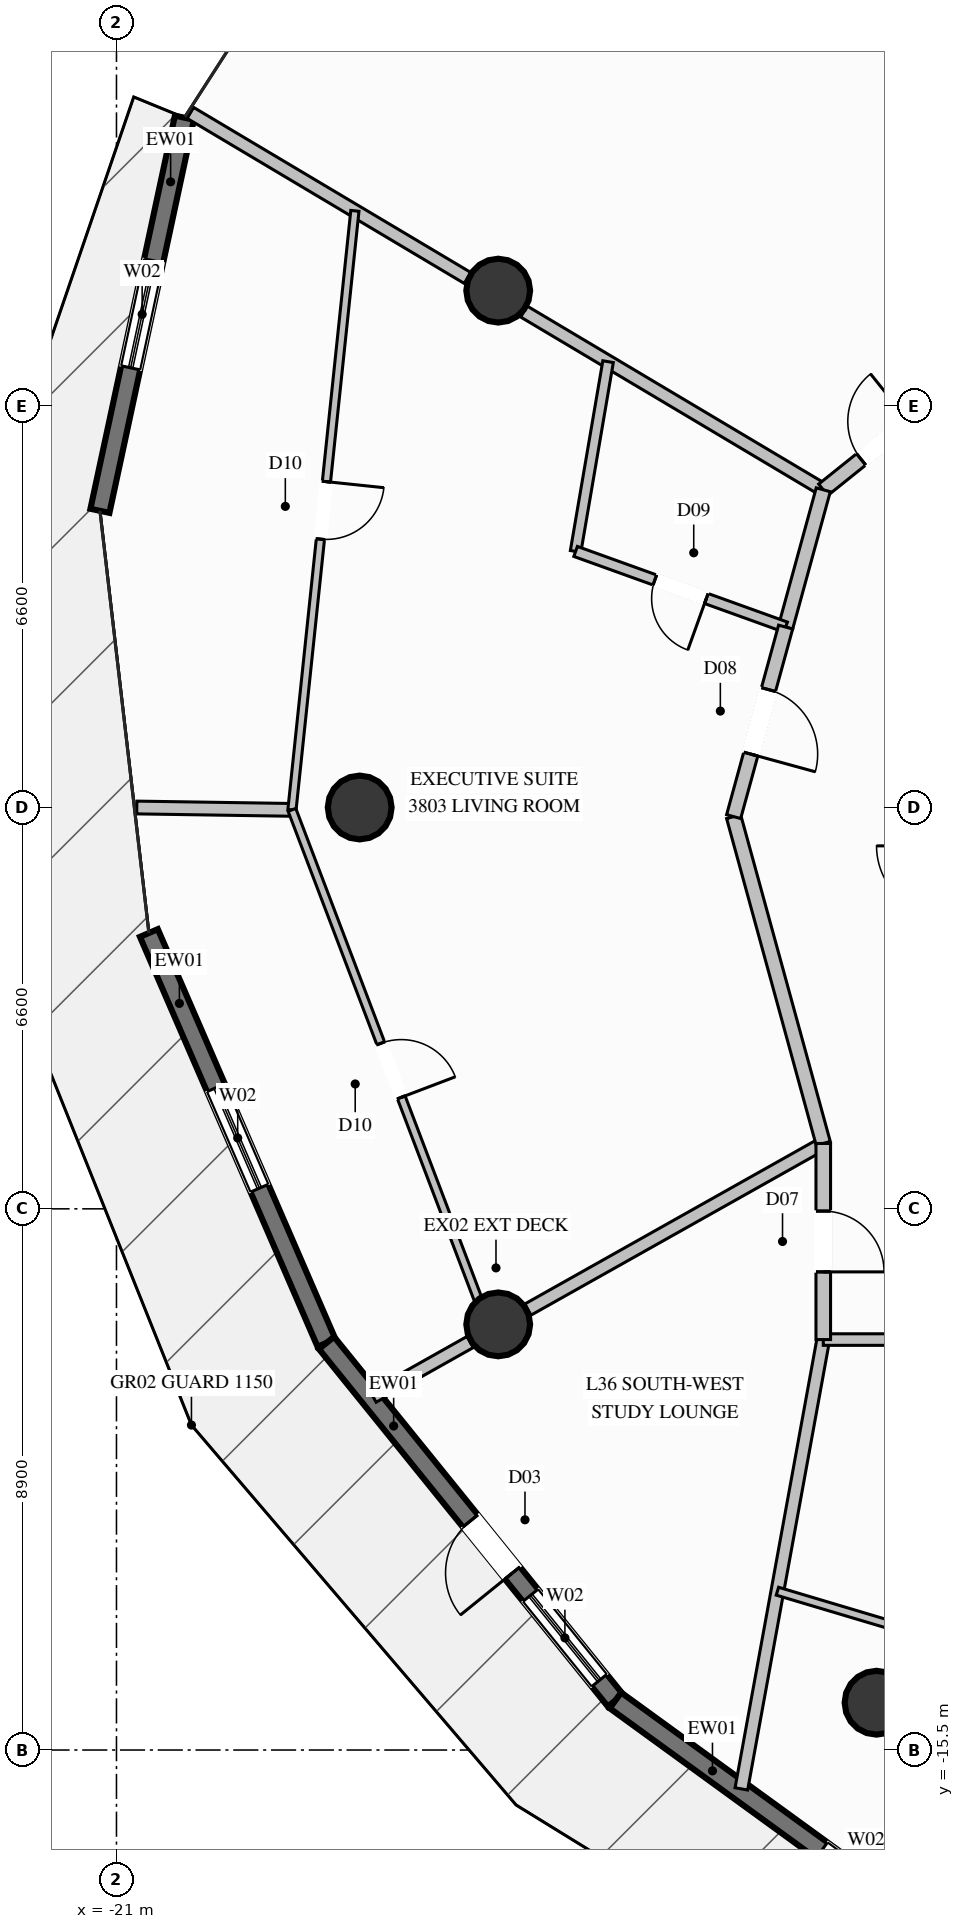
"""IFC4 building model, lengths in metres.
Left out: names, types, materials, properties, quantities, classifications, styles, units other than length and angle.
Written with IfcOpenShell. Run it as: python <this file> out.ifc"""

import sys

from ifc_helpers import new_model, si_unit, direction, frame, frame_2d, origin, origin_2d, place, context, subcontext, project, spatial, rectangle, circle, extrude, element, fill, save


model = new_model("IFC4")
c1 = context("Model", 3, precision=1e-05, world=origin(), true_north=direction((0.0, 1.0)))
c2 = subcontext(c1, "Body", "Model", "MODEL_VIEW")
j1 = project(units=[si_unit("LENGTHUNIT", "METRE"), si_unit("PLANEANGLEUNIT", "RADIAN")], contexts=[c1])
p1 = place(None, origin())
s1 = spatial("IfcSite", under=j1, at=p1, CompositionType="ELEMENT")
p2 = place(p1, origin())
s2 = spatial("IfcBuilding", under=s1, at=p2, CompositionType="ELEMENT")
p3 = place(p2, frame((0.0, 0.0, 142.2)))
s3 = spatial("IfcBuildingStorey", under=s2, at=p3, CompositionType="ELEMENT", Elevation=142.2)
for number, where, z_axis, x_axis in (
    (1, (-14.722, 8.5, 0.0), (0.0, 0.0, 1.0), (1.0, 0.0, 0.0)),
    (2, (-17.0, 0.0, 0.0), (0.0, 0.0, 1.0), (1.0, 0.0, 0.0)),
    (3, (-14.722, -8.5, 0.0), (0.0, 0.0, 1.0), (1.0, 0.0, 0.0)),
    (4, (-8.5, -14.722, 0.0), (0.0, 0.0, 1.0), (1.0, 0.0, 0.0)),
):
    element("IfcColumn", number, at=place(p3, frame(where, z_axis=z_axis, x_axis=x_axis)), inside=s3, PredefinedType="COLUMN", context=c2, shape_type="SweptSolid", body=[
        extrude(circle(Radius=0.525, at=origin_2d()), origin(), (0.0, 0.0, 1.0), 3.6),
    ])
p4 = place(p3, frame((-21.272, 4.879, 0.0), z_axis=(0.0, 0.0, 1.0), x_axis=(0.210040904663, 0.977692599117, 0.0)))
e5 = element("IfcWall", 5, at=p4, inside=s3, PredefinedType="SOLIDWALL", context=c2, shape_type="SweptSolid", body=[
    extrude(rectangle(XDim=6.613, YDim=0.32, at=frame_2d((3.306, 0.0))), origin(), (0.0, 0.0, 1.0), 3.35),
])
p5 = place(p4, frame((2.405, 0.0, 0.35)))
e6 = element("IfcOpeningElement", 6, at=p5, cuts=e5, PredefinedType="OPENING", context=c2, shape_type="SweptSolid", body=[
    extrude(rectangle(XDim=1.8, YDim=2.6, at=frame_2d((0.9, 1.3))), frame((0.0, 0.17, 0.0), z_axis=(0.0, -1.0, 0.0), x_axis=(1.0, 0.0, 0.0)), (0.0, 0.0, 1.0), 0.34),
])
p6 = place(p3, frame((-17.546, -8.805, 0.0), z_axis=(0.0, 0.0, 1.0), x_axis=(-0.39761396578, 0.917552796419, 0.0)))
e7 = element("IfcWall", 7, at=p6, inside=s3, PredefinedType="SOLIDWALL", context=c2, shape_type="SweptSolid", body=[
    extrude(rectangle(XDim=7.347, YDim=0.32, at=frame_2d((3.673, 0.0))), origin(), (0.0, 0.0, 1.0), 3.35),
])
p7 = place(p6, frame((2.773, 0.0, 0.35)))
e8 = element("IfcOpeningElement", 8, at=p7, cuts=e7, PredefinedType="OPENING", context=c2, shape_type="SweptSolid", body=[
    extrude(rectangle(XDim=1.8, YDim=2.6, at=frame_2d((0.9, 1.3))), frame((0.0, 0.17, 0.0), z_axis=(0.0, -1.0, 0.0), x_axis=(1.0, 0.0, 0.0)), (0.0, 0.0, 1.0), 0.34),
])
p8 = place(p3, frame((-12.794, -14.684, 0.0), z_axis=(0.0, 0.0, 1.0), x_axis=(-0.628609951101, 0.77772072711, 0.0)))
e9 = element("IfcWall", 9, at=p8, inside=s3, PredefinedType="SOLIDWALL", context=c2, shape_type="SweptSolid", body=[
    extrude(rectangle(XDim=7.56, YDim=0.32, at=frame_2d((3.78, 0.0))), origin(), (0.0, 0.0, 1.0), 3.35),
])
p9 = place(p8, frame((0.422, 0.0, 0.35)))
e10 = element("IfcOpeningElement", 10, at=p9, cuts=e9, PredefinedType="OPENING", context=c2, shape_type="SweptSolid", body=[
    extrude(rectangle(XDim=1.8, YDim=2.6, at=frame_2d((0.9, 1.3))), frame((0.0, 0.17, 0.0), z_axis=(0.0, -1.0, 0.0), x_axis=(1.0, 0.0, 0.0)), (0.0, 0.0, 1.0), 0.34),
])
p10 = place(p8, frame((2.695, 0.0, 0.0)))
e11 = element("IfcOpeningElement", 11, at=p10, cuts=e9, PredefinedType="OPENING", context=c2, shape_type="SweptSolid", body=[
    extrude(rectangle(XDim=1.1, YDim=2.2, at=frame_2d((0.55, 1.1))), frame((0.0, 0.17, 0.0), z_axis=(0.0, -1.0, 0.0), x_axis=(1.0, 0.0, 0.0)), (0.0, 0.0, 1.0), 0.34),
])
p11 = place(p3, frame((-6.678, -19.125, 0.0), z_axis=(0.0, 0.0, 1.0), x_axis=(-0.809180040303, 0.587560773347, 0.0)))
e12 = element("IfcWall", 12, at=p11, inside=s3, PredefinedType="SOLIDWALL", context=c2, shape_type="SweptSolid", body=[
    extrude(rectangle(XDim=7.558, YDim=0.32, at=frame_2d((3.779, 0.0))), origin(), (0.0, 0.0, 1.0), 3.35),
])
p12 = place(p11, frame((1.564, 0.0, 0.35)))
e13 = element("IfcOpeningElement", 13, at=p12, cuts=e12, PredefinedType="OPENING", context=c2, shape_type="SweptSolid", body=[
    extrude(rectangle(XDim=1.8, YDim=2.6, at=frame_2d((0.9, 1.3))), frame((0.0, 0.17, 0.0), z_axis=(0.0, -1.0, 0.0), x_axis=(1.0, 0.0, 0.0)), (0.0, 0.0, 1.0), 0.34),
])
p13 = place(p3, frame((-9.376, 5.225, 0.0), z_axis=(0.0, 0.0, 1.0), x_axis=(-0.859254979659, 0.511547534381, 0.0)))
e14 = element("IfcWall", 14, at=p13, inside=s3, PredefinedType="PARTITIONING", context=c2, shape_type="SweptSolid", body=[
    extrude(rectangle(XDim=5.729, YDim=0.21, at=frame_2d((2.865, 0.0))), origin(), (0.0, 0.0, 1.0), 2.718),
])
p14 = place(p3, frame((-15.226, 8.708, 0.0), z_axis=(0.0, 0.0, 1.0), x_axis=(-0.859169116006, 0.511691733471, 0.0)))
e15 = element("IfcWall", 15, at=p14, inside=s3, PredefinedType="PARTITIONING", context=c2, shape_type="SweptSolid", body=[
    extrude(rectangle(XDim=5.306, YDim=0.21, at=frame_2d((2.653, 0.0))), origin(), (0.0, 0.0, 1.0), 3.35),
])
p15 = place(p3, frame((-9.376, -5.525, 0.0), z_axis=(0.0, 0.0, 1.0), x_axis=(-0.87160595107, -0.49020716647, 0.0)))
e16 = element("IfcWall", 16, at=p15, inside=s3, PredefinedType="PARTITIONING", context=c2, shape_type="SweptSolid", body=[
    extrude(rectangle(XDim=5.573, YDim=0.21, at=frame_2d((2.787, 0.0))), origin(), (0.0, 0.0, 1.0), 2.718),
])
p16 = place(p3, frame((-15.183, -8.79, 0.0), z_axis=(0.0, 0.0, 1.0), x_axis=(-0.871550642062, -0.490305494892, 0.0)))
e17 = element("IfcWall", 17, at=p16, inside=s3, PredefinedType="PARTITIONING", context=c2, shape_type="SweptSolid", body=[
    extrude(rectangle(XDim=1.833, YDim=0.21, at=frame_2d((0.917, 0.0))), origin(), (0.0, 0.0, 1.0), 3.35),
])
p17 = place(p3, frame((-9.376, 5.225, 0.0), z_axis=(0.0, 0.0, 1.0), x_axis=(0.780061082582, 0.625703370169, 0.0)))
e18 = element("IfcWall", 18, at=p17, inside=s3, PredefinedType="PARTITIONING", context=c2, shape_type="SweptSolid", body=[
    extrude(rectangle(XDim=2.597, YDim=0.24, at=frame_2d((1.299, 0.0))), origin(), (0.0, 0.0, 1.0), 3.35),
])
p18 = place(p17, frame((0.799, 0.0, 0.0)))
e19 = element("IfcOpeningElement", 19, at=p18, cuts=e18, PredefinedType="OPENING", context=c2, shape_type="SweptSolid", body=[
    extrude(rectangle(XDim=1.0, YDim=2.2, at=frame_2d((0.5, 1.1))), frame((0.0, 0.13, 0.0), z_axis=(0.0, -1.0, 0.0), x_axis=(1.0, 0.0, 0.0)), (0.0, 0.0, 1.0), 0.26),
])
p19 = place(p3, frame((-9.376, 5.225, 0.0), z_axis=(0.0, 0.0, 1.0), x_axis=(-0.264431780812, -0.964404393031, 0.0)))
e20 = element("IfcWall", 20, at=p19, inside=s3, PredefinedType="PARTITIONING", context=c2, shape_type="SweptSolid", body=[
    extrude(rectangle(XDim=2.341, YDim=0.24, at=frame_2d((1.171, 0.0))), origin(), (0.0, 0.0, 1.0), 3.35),
])
p20 = place(p3, frame((-12.915, 7.332, 0.0), z_axis=(0.0, 0.0, 1.0), x_axis=(-0.168623538304, -0.985680527519, 0.0)))
e21 = element("IfcWall", 21, at=p20, inside=s3, PredefinedType="PLUMBINGWALL", context=c2, shape_type="SweptSolid", body=[
    extrude(rectangle(XDim=3.167, YDim=0.175, at=frame_2d((1.583, 0.0))), origin(), (0.0, 0.0, 1.0), 3.35),
])
p21 = place(p3, frame((-9.995, 2.967, 0.0), z_axis=(0.0, 0.0, 1.0), x_axis=(-0.940843318569, 0.338841924656, 0.0)))
e22 = element("IfcWall", 22, at=p21, inside=s3, PredefinedType="PLUMBINGWALL", context=c2, shape_type="SweptSolid", body=[
    extrude(rectangle(XDim=3.671, YDim=0.175, at=frame_2d((1.835, 0.0))), origin(), (0.0, 0.0, 1.0), 3.35),
])
p22 = place(p21, frame((1.386, 0.0, 0.0)))
e23 = element("IfcOpeningElement", 23, at=p22, cuts=e22, PredefinedType="OPENING", context=c2, shape_type="SweptSolid", body=[
    extrude(rectangle(XDim=0.9, YDim=2.1, at=frame_2d((0.45, 1.05))), frame((0.0, 0.098, 0.0), z_axis=(0.0, -1.0, 0.0), x_axis=(1.0, 0.0, 0.0)), (0.0, 0.0, 1.0), 0.195),
])
p23 = place(p3, frame((-18.114, -0.039, 0.0), z_axis=(0.0, 0.0, 1.0), x_axis=(-0.999882874418, 0.015304817747, 0.0)))
e24 = element("IfcWall", 24, at=p23, inside=s3, PredefinedType="PARTITIONING", context=c2, shape_type="SweptSolid", body=[
    extrude(rectangle(XDim=2.552, YDim=0.21, at=frame_2d((1.276, 0.0))), origin(), (0.0, 0.0, 1.0), 3.35),
])
p24 = place(p3, frame((-10.85, -0.15, 0.0), z_axis=(0.0, 0.0, 1.0), x_axis=(0.264488542062, -0.964388827765, 0.0)))
e25 = element("IfcWall", 25, at=p24, inside=s3, PredefinedType="PARTITIONING", context=c2, shape_type="SweptSolid", body=[
    extrude(rectangle(XDim=5.573, YDim=0.24, at=frame_2d((2.787, 0.0))), origin(), (0.0, 0.0, 1.0), 3.35),
])
p25 = place(p3, frame((-9.995, 2.967, 0.0), z_axis=(0.0, 0.0, 1.0), x_axis=(-0.264529660797, -0.9643775498, 0.0)))
e26 = element("IfcWall", 26, at=p25, inside=s3, PredefinedType="PARTITIONING", context=c2, shape_type="SweptSolid", body=[
    extrude(rectangle(XDim=3.232, YDim=0.24, at=frame_2d((1.616, 0.0))), origin(), (0.0, 0.0, 1.0), 3.35),
])
p26 = place(p25, frame((1.066, 0.0, 0.0)))
e27 = element("IfcOpeningElement", 27, at=p26, cuts=e26, PredefinedType="OPENING", context=c2, shape_type="SweptSolid", body=[
    extrude(rectangle(XDim=1.1, YDim=2.3, at=frame_2d((0.55, 1.15))), frame((0.0, 0.13, 0.0), z_axis=(0.0, -1.0, 0.0), x_axis=(1.0, 0.0, 0.0)), (0.0, 0.0, 1.0), 0.26),
])
p27 = place(p3, frame((-17.079, 9.812, 0.0), z_axis=(0.0, 0.0, 1.0), x_axis=(-0.104480781991, -0.994526905717, 0.0)))
e28 = element("IfcWall", 28, at=p27, inside=s3, PredefinedType="PARTITIONING", context=c2, shape_type="SweptSolid", body=[
    extrude(rectangle(XDim=9.905, YDim=0.135, at=frame_2d((4.953, 0.0))), origin(), (0.0, 0.0, 1.0), 3.35),
])
p28 = place(p27, frame((4.478, 0.0, 0.0)))
e29 = element("IfcOpeningElement", 29, at=p28, cuts=e28, PredefinedType="OPENING", context=c2, shape_type="SweptSolid", body=[
    extrude(rectangle(XDim=0.95, YDim=2.1, at=frame_2d((0.475, 1.05))), frame((0.0, 0.078, 0.0), z_axis=(0.0, -1.0, 0.0), x_axis=(1.0, 0.0, 0.0)), (0.0, 0.0, 1.0), 0.155),
])
p29 = place(p3, frame((-18.114, -0.039, 0.0), z_axis=(0.0, 0.0, 1.0), x_axis=(0.355469126908, -0.93468802272, 0.0)))
e30 = element("IfcWall", 30, at=p29, inside=s3, PredefinedType="PARTITIONING", context=c2, shape_type="SweptSolid", body=[
    extrude(rectangle(XDim=9.166, YDim=0.135, at=frame_2d((4.583, 0.0))), origin(), (0.0, 0.0, 1.0), 2.879),
])
p30 = place(p29, frame((4.108, 0.0, 0.0)))
e31 = element("IfcOpeningElement", 31, at=p30, cuts=e30, PredefinedType="OPENING", context=c2, shape_type="SweptSolid", body=[
    extrude(rectangle(XDim=0.95, YDim=2.1, at=frame_2d((0.475, 1.05))), frame((0.0, 0.078, 0.0), z_axis=(0.0, -1.0, 0.0), x_axis=(1.0, 0.0, 0.0)), (0.0, 0.0, 1.0), 0.155),
])
p31 = place(p3, frame((-9.376, -8.75, 0.0), z_axis=(0.0, 0.0, 1.0), x_axis=(-0.17933451975, -0.983788153022, 0.0)))
e32 = element("IfcWall", 32, at=p31, inside=s3, PredefinedType="PARTITIONING", context=c2, shape_type="SweptSolid", body=[
    extrude(rectangle(XDim=7.511, YDim=0.21, at=frame_2d((3.755, 0.0))), origin(), (0.0, 0.0, 1.0), 3.35),
])
p32 = place(p3, frame((-9.376, -8.75, 0.0), z_axis=(0.0, 0.0, 1.0), x_axis=(1.0, 0.0, 0.0)))
e33 = element("IfcWall", 33, at=p32, inside=s3, PredefinedType="PARTITIONING", context=c2, shape_type="SweptSolid", body=[
    extrude(rectangle(XDim=9.376, YDim=0.19, at=frame_2d((4.688, 0.0))), origin(), (0.0, 0.0, 1.0), 3.35),
])
p33 = place(p32, frame((4.213, 0.0, 0.0)))
e34 = element("IfcOpeningElement", 34, at=p33, cuts=e33, PredefinedType="OPENING", context=c2, shape_type="SweptSolid", body=[
    extrude(rectangle(XDim=0.95, YDim=2.1, at=frame_2d((0.475, 1.05))), frame((0.0, 0.105, 0.0), z_axis=(0.0, -1.0, 0.0), x_axis=(1.0, 0.0, 0.0)), (0.0, 0.0, 1.0), 0.21),
])
p34 = place(p3, frame((-9.376, -5.525, 0.0), z_axis=(0.0, 0.0, 1.0), x_axis=(0.0, -1.0, 0.0)))
e35 = element("IfcWall", 35, at=p34, inside=s3, PredefinedType="PARTITIONING", context=c2, shape_type="SweptSolid", body=[
    extrude(rectangle(XDim=3.225, YDim=0.24, at=frame_2d((1.613, 0.0))), origin(), (0.0, 0.0, 1.0), 3.35),
])
p35 = place(p34, frame((1.112, 0.0, 0.0)))
e36 = element("IfcOpeningElement", 36, at=p35, cuts=e35, PredefinedType="OPENING", context=c2, shape_type="SweptSolid", body=[
    extrude(rectangle(XDim=1.0, YDim=2.2, at=frame_2d((0.5, 1.1))), frame((0.0, 0.13, 0.0), z_axis=(0.0, -1.0, 0.0), x_axis=(1.0, 0.0, 0.0)), (0.0, 0.0, 1.0), 0.26),
])
p36 = place(p3, frame((-10.13, -12.888, 0.0), z_axis=(0.0, 0.0, 1.0), x_axis=(0.958256793562, -0.28590893234, 0.0)))
e37 = element("IfcWall", 37, at=p36, inside=s3, PredefinedType="PARTITIONING", context=c2, shape_type="SweptSolid", body=[
    extrude(rectangle(XDim=10.836, YDim=0.135, at=frame_2d((5.418, 0.0))), origin(), (0.0, 0.0, 1.0), 3.35),
])
p37 = place(p36, frame((4.943, 0.0, 0.0)))
e38 = element("IfcOpeningElement", 38, at=p37, cuts=e37, PredefinedType="OPENING", context=c2, shape_type="SweptSolid", body=[
    extrude(rectangle(XDim=0.95, YDim=2.1, at=frame_2d((0.475, 1.05))), frame((0.0, 0.078, 0.0), z_axis=(0.0, -1.0, 0.0), x_axis=(1.0, 0.0, 0.0)), (0.0, 0.0, 1.0), 0.155),
])
p38 = place(p5, origin())
e39 = element("IfcWindow", 39, at=p38, inside=s3, PartitioningType="SINGLE_PANEL", PredefinedType="WINDOW", context=c2, shape_type="SweptSolid", body=[
    extrude(rectangle(XDim=1.8, YDim=2.6, at=frame_2d((0.9, 1.3))), frame((0.0, 0.03, 0.0), z_axis=(0.0, -1.0, 0.0), x_axis=(1.0, 0.0, 0.0)), (0.0, 0.0, 1.0), 0.06),
])
fill(e6, e39)
p39 = place(p7, origin())
e40 = element("IfcWindow", 40, at=p39, inside=s3, PartitioningType="SINGLE_PANEL", PredefinedType="WINDOW", context=c2, shape_type="SweptSolid", body=[
    extrude(rectangle(XDim=1.8, YDim=2.6, at=frame_2d((0.9, 1.3))), frame((0.0, 0.03, 0.0), z_axis=(0.0, -1.0, 0.0), x_axis=(1.0, 0.0, 0.0)), (0.0, 0.0, 1.0), 0.06),
])
fill(e8, e40)
p40 = place(p9, origin())
e41 = element("IfcWindow", 41, at=p40, inside=s3, PartitioningType="SINGLE_PANEL", PredefinedType="WINDOW", context=c2, shape_type="SweptSolid", body=[
    extrude(rectangle(XDim=1.8, YDim=2.6, at=frame_2d((0.9, 1.3))), frame((0.0, 0.03, 0.0), z_axis=(0.0, -1.0, 0.0), x_axis=(1.0, 0.0, 0.0)), (0.0, 0.0, 1.0), 0.06),
])
fill(e10, e41)
p41 = place(p10, origin())
e42 = element("IfcDoor", 42, at=p41, inside=s3, OperationType="SINGLE_SWING_LEFT", PredefinedType="DOOR", context=c2, shape_type="SweptSolid", body=[
    extrude(rectangle(XDim=1.1, YDim=2.2, at=frame_2d((0.55, 1.1))), frame((0.0, 0.025, 0.0), z_axis=(0.0, -1.0, 0.0), x_axis=(1.0, 0.0, 0.0)), (0.0, 0.0, 1.0), 0.05),
])
fill(e11, e42)
p42 = place(p12, origin())
e43 = element("IfcWindow", 43, at=p42, inside=s3, PartitioningType="SINGLE_PANEL", PredefinedType="WINDOW", context=c2, shape_type="SweptSolid", body=[
    extrude(rectangle(XDim=1.8, YDim=2.6, at=frame_2d((0.9, 1.3))), frame((0.0, 0.03, 0.0), z_axis=(0.0, -1.0, 0.0), x_axis=(1.0, 0.0, 0.0)), (0.0, 0.0, 1.0), 0.06),
])
fill(e13, e43)
p43 = place(p18, origin())
e44 = element("IfcDoor", 44, at=p43, inside=s3, OperationType="SINGLE_SWING_RIGHT", PredefinedType="DOOR", context=c2, shape_type="SweptSolid", body=[
    extrude(rectangle(XDim=1.0, YDim=2.2, at=frame_2d((0.5, 1.1))), frame((0.0, 0.025, 0.0), z_axis=(0.0, -1.0, 0.0), x_axis=(1.0, 0.0, 0.0)), (0.0, 0.0, 1.0), 0.05),
])
fill(e19, e44)
p44 = place(p22, origin())
e45 = element("IfcDoor", 45, at=p44, inside=s3, OperationType="SINGLE_SWING_LEFT", PredefinedType="DOOR", context=c2, shape_type="SweptSolid", body=[
    extrude(rectangle(XDim=0.9, YDim=2.1, at=frame_2d((0.45, 1.05))), frame((0.0, 0.025, 0.0), z_axis=(0.0, -1.0, 0.0), x_axis=(1.0, 0.0, 0.0)), (0.0, 0.0, 1.0), 0.05),
])
fill(e23, e45)
p45 = place(p26, origin())
e46 = element("IfcDoor", 46, at=p45, inside=s3, OperationType="SINGLE_SWING_RIGHT", PredefinedType="DOOR", context=c2, shape_type="SweptSolid", body=[
    extrude(rectangle(XDim=1.1, YDim=2.3, at=frame_2d((0.55, 1.15))), frame((0.0, 0.025, 0.0), z_axis=(0.0, -1.0, 0.0), x_axis=(1.0, 0.0, 0.0)), (0.0, 0.0, 1.0), 0.05),
])
fill(e27, e46)
p46 = place(p28, origin())
e47 = element("IfcDoor", 47, at=p46, inside=s3, OperationType="SINGLE_SWING_LEFT", PredefinedType="DOOR", context=c2, shape_type="SweptSolid", body=[
    extrude(rectangle(XDim=0.95, YDim=2.1, at=frame_2d((0.475, 1.05))), frame((0.0, 0.025, 0.0), z_axis=(0.0, -1.0, 0.0), x_axis=(1.0, 0.0, 0.0)), (0.0, 0.0, 1.0), 0.05),
])
fill(e29, e47)
p47 = place(p30, origin())
e48 = element("IfcDoor", 48, at=p47, inside=s3, OperationType="SINGLE_SWING_RIGHT", PredefinedType="DOOR", context=c2, shape_type="SweptSolid", body=[
    extrude(rectangle(XDim=0.95, YDim=2.1, at=frame_2d((0.475, 1.05))), frame((0.0, 0.025, 0.0), z_axis=(0.0, -1.0, 0.0), x_axis=(1.0, 0.0, 0.0)), (0.0, 0.0, 1.0), 0.05),
])
fill(e31, e48)
p48 = place(p35, origin())
e49 = element("IfcDoor", 49, at=p48, inside=s3, OperationType="SINGLE_SWING_RIGHT", PredefinedType="DOOR", context=c2, shape_type="SweptSolid", body=[
    extrude(rectangle(XDim=1.0, YDim=2.2, at=frame_2d((0.5, 1.1))), frame((0.0, 0.025, 0.0), z_axis=(0.0, -1.0, 0.0), x_axis=(1.0, 0.0, 0.0)), (0.0, 0.0, 1.0), 0.05),
])
fill(e36, e49)
save(model, sys.argv[1])
